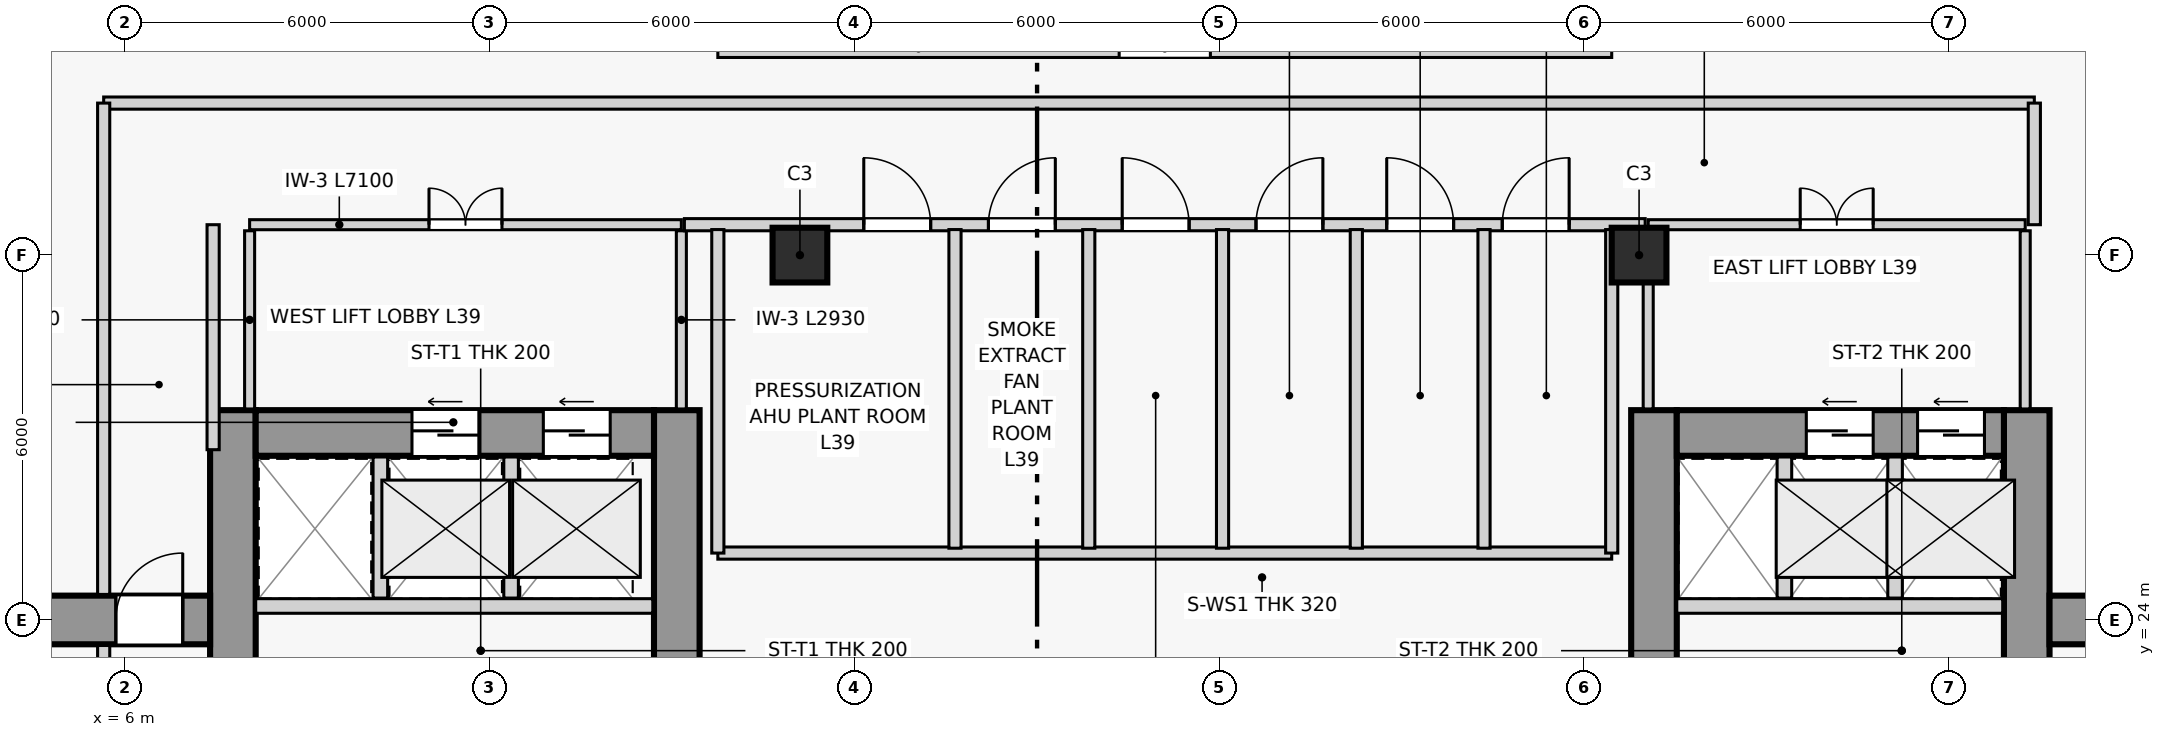
"""IFC4 building model, lengths in metres.
Left out: names, types, materials, properties, quantities, classifications, styles, units other than length and angle.
Written with IfcOpenShell. Run it as: python <this file> out.ifc"""

import sys

from ifc_helpers import new_model, si_unit, direction, frame, frame_2d, origin, origin_2d, place, context, subcontext, project, spatial, rectangle, extrude, source, transform, mapped, element, fill, save


model = new_model("IFC4")
c1 = context("Model", 3, precision=1e-05, world=origin(), true_north=direction((0.0, 1.0)))
c2 = subcontext(c1, "Body", "Model", "MODEL_VIEW")
j1 = project(units=[si_unit("LENGTHUNIT", "METRE"), si_unit("PLANEANGLEUNIT", "RADIAN")], contexts=[c1])
p1 = place(None, origin())
s1 = spatial("IfcSite", under=j1, at=p1, CompositionType="ELEMENT")
p2 = place(p1, origin())
s2 = spatial("IfcBuilding", under=s1, at=p2, CompositionType="ELEMENT")
p3 = place(p2, frame((0.0, 0.0, 148.5)))
s3 = spatial("IfcBuildingStorey", under=s2, at=p3, CompositionType="ELEMENT", Elevation=148.5)
p4 = place(p3, frame((7.775, 14.6, 0.0), z_axis=(0.0, 0.0, 1.0), x_axis=(0.0, 1.0, 0.0)))
e1 = element("IfcWall", 1, at=p4, inside=s3, PredefinedType="SHEAR", context=c2, shape_type="SweptSolid", body=[
    extrude(rectangle(XDim=12.85, YDim=0.75, at=frame_2d((6.425, 0.0))), origin(), (0.0, 0.0, 1.0), 7.2),
])
p5 = place(p3, frame((15.075, 14.6, 0.0), z_axis=(0.0, 0.0, 1.0), x_axis=(0.0, 1.0, 0.0)))
e2 = element("IfcWall", 2, at=p5, inside=s3, PredefinedType="SHEAR", context=c2, shape_type="SweptSolid", body=[
    extrude(rectangle(XDim=12.85, YDim=0.75, at=frame_2d((6.425, 0.0))), origin(), (0.0, 0.0, 1.0), 7.2),
])
p6 = place(p5, frame((5.5, 0.0, 0.0)))
e3 = element("IfcOpeningElement", 3, at=p6, cuts=e2, PredefinedType="OPENING", context=c2, shape_type="SweptSolid", body=[
    extrude(rectangle(XDim=1.1, YDim=2.2, at=frame_2d((0.55, 1.1))), frame((0.0, 0.385, 0.0), z_axis=(0.0, -1.0, 0.0), x_axis=(1.0, 0.0, 0.0)), (0.0, 0.0, 1.0), 0.77),
])
p7 = place(p3, frame((8.15, 27.075, 0.0), z_axis=(0.0, 0.0, 1.0), x_axis=(1.0, 0.0, 0.0)))
e4 = element("IfcWall", 4, at=p7, inside=s3, PredefinedType="SHEAR", context=c2, shape_type="SweptSolid", body=[
    extrude(rectangle(XDim=6.55, YDim=0.75, at=frame_2d((3.275, 0.0))), origin(), (0.0, 0.0, 1.0), 7.2),
])
p8 = place(p7, frame((2.57, 0.0, 0.0)))
e5 = element("IfcOpeningElement", 5, at=p8, cuts=e4, PredefinedType="OPENING", context=c2, shape_type="SweptSolid", body=[
    extrude(rectangle(XDim=1.1, YDim=2.2, at=frame_2d((0.55, 1.1))), frame((0.0, 0.385, 0.0), z_axis=(0.0, -1.0, 0.0), x_axis=(1.0, 0.0, 0.0)), (0.0, 0.0, 1.0), 0.77),
])
p9 = place(p7, frame((4.73, 0.0, 0.0)))
e6 = element("IfcOpeningElement", 6, at=p9, cuts=e4, PredefinedType="OPENING", context=c2, shape_type="SweptSolid", body=[
    extrude(rectangle(XDim=1.1, YDim=2.2, at=frame_2d((0.55, 1.1))), frame((0.0, 0.385, 0.0), z_axis=(0.0, -1.0, 0.0), x_axis=(1.0, 0.0, 0.0)), (0.0, 0.0, 1.0), 0.77),
])
p10 = place(p3, frame((31.145, 14.6, 0.0), z_axis=(0.0, 0.0, 1.0), x_axis=(0.0, 1.0, 0.0)))
e7 = element("IfcWall", 7, at=p10, inside=s3, PredefinedType="SHEAR", context=c2, shape_type="SweptSolid", body=[
    extrude(rectangle(XDim=12.85, YDim=0.75, at=frame_2d((6.425, 0.0))), origin(), (0.0, 0.0, 1.0), 7.2),
])
p11 = place(p3, frame((37.275, 14.6, 0.0), z_axis=(0.0, 0.0, 1.0), x_axis=(0.0, 1.0, 0.0)))
e8 = element("IfcWall", 8, at=p11, inside=s3, PredefinedType="SHEAR", context=c2, shape_type="SweptSolid", body=[
    extrude(rectangle(XDim=12.85, YDim=0.75, at=frame_2d((6.425, 0.0))), origin(), (0.0, 0.0, 1.0), 7.2),
])
p12 = place(p11, frame((5.5, 0.0, 0.0)))
e9 = element("IfcOpeningElement", 9, at=p12, cuts=e8, PredefinedType="OPENING", context=c2, shape_type="SweptSolid", body=[
    extrude(rectangle(XDim=1.1, YDim=2.2, at=frame_2d((0.55, 1.1))), frame((0.0, 0.385, 0.0), z_axis=(0.0, -1.0, 0.0), x_axis=(1.0, 0.0, 0.0)), (0.0, 0.0, 1.0), 0.77),
])
p13 = place(p3, frame((31.52, 27.075, 0.0), z_axis=(0.0, 0.0, 1.0), x_axis=(1.0, 0.0, 0.0)))
e10 = element("IfcWall", 10, at=p13, inside=s3, PredefinedType="SHEAR", context=c2, shape_type="SweptSolid", body=[
    extrude(rectangle(XDim=5.38, YDim=0.75, at=frame_2d((2.69, 0.0))), origin(), (0.0, 0.0, 1.0), 7.2),
])
p14 = place(p13, frame((2.13, 0.0, 0.0)))
e11 = element("IfcOpeningElement", 11, at=p14, cuts=e10, PredefinedType="OPENING", context=c2, shape_type="SweptSolid", body=[
    extrude(rectangle(XDim=1.1, YDim=2.2, at=frame_2d((0.55, 1.1))), frame((0.0, 0.385, 0.0), z_axis=(0.0, -1.0, 0.0), x_axis=(1.0, 0.0, 0.0)), (0.0, 0.0, 1.0), 0.77),
])
p15 = place(p13, frame((3.96, 0.0, 0.0)))
e12 = element("IfcOpeningElement", 12, at=p15, cuts=e10, PredefinedType="OPENING", context=c2, shape_type="SweptSolid", body=[
    extrude(rectangle(XDim=1.1, YDim=2.2, at=frame_2d((0.55, 1.1))), frame((0.0, 0.385, 0.0), z_axis=(0.0, -1.0, 0.0), x_axis=(1.0, 0.0, 0.0)), (0.0, 0.0, 1.0), 0.77),
])
m1 = source(origin(), c2, "Body", "SweptSolid", [
    extrude(rectangle(XDim=0.9, YDim=0.9, at=origin_2d()), origin(), (0.0, 0.0, 1.0), 7.2),
])
for number, where, z_axis, x_axis in (
    (13, (17.1, 30.0, 0.0), (0.0, 0.0, 1.0), (1.0, 0.0, 0.0)),
    (14, (30.9, 30.0, 0.0), (0.0, 0.0, 1.0), (1.0, 0.0, 0.0)),
):
    element("IfcColumn", number, at=place(p3, frame(where, z_axis=z_axis, x_axis=x_axis)), inside=s3, PredefinedType="COLUMN", context=c2, shape_type="MappedRepresentation", body=[
        mapped(m1, transform((0.0, 0.0, 0.0), scale=1.0)),
    ])
p16 = place(p3, frame((0.65, 24.0, 0.0), z_axis=(0.0, 0.0, 1.0), x_axis=(1.0, 0.0, 0.0)))
e15 = element("IfcWall", 15, at=p16, inside=s3, PredefinedType="SOLIDWALL", context=c2, shape_type="SweptSolid", body=[
    extrude(rectangle(XDim=6.75, YDim=0.8, at=frame_2d((3.375, 0.0))), origin(), (0.0, 0.0, 1.0), 6.55),
])
p17 = place(p16, frame((5.2, 0.0, 0.0)))
e16 = element("IfcOpeningElement", 16, at=p17, cuts=e15, PredefinedType="OPENING", context=c2, shape_type="SweptSolid", body=[
    extrude(rectangle(XDim=1.1, YDim=2.2, at=frame_2d((0.55, 1.1))), frame((0.0, 0.41, 0.0), z_axis=(0.0, -1.0, 0.0), x_axis=(1.0, 0.0, 0.0)), (0.0, 0.0, 1.0), 0.82),
])
p18 = place(p3, frame((37.65, 24.0, 0.0), z_axis=(0.0, 0.0, 1.0), x_axis=(1.0, 0.0, 0.0)))
e17 = element("IfcWall", 17, at=p18, inside=s3, PredefinedType="SOLIDWALL", context=c2, shape_type="SweptSolid", body=[
    extrude(rectangle(XDim=6.7, YDim=0.8, at=frame_2d((3.35, 0.0))), origin(), (0.0, 0.0, 1.0), 6.55),
])
p19 = place(p3, frame((15.75, 33.4, 0.0), z_axis=(0.0, 0.0, 1.0), x_axis=(1.0, 0.0, 0.0)))
e18 = element("IfcWall", 18, at=p19, inside=s3, PredefinedType="SOLIDWALL", context=c2, shape_type="SweptSolid", body=[
    extrude(rectangle(XDim=14.7, YDim=0.3, at=frame_2d((7.35, 0.0))), origin(), (0.0, 0.0, 1.0), 6.55),
])
p20 = place(p19, frame((6.6, 0.0, 0.0)))
e19 = element("IfcOpeningElement", 19, at=p20, cuts=e18, PredefinedType="OPENING", context=c2, shape_type="SweptSolid", body=[
    extrude(rectangle(XDim=1.5, YDim=2.3, at=frame_2d((0.75, 1.15))), frame((0.0, 0.16, 0.0), z_axis=(0.0, -1.0, 0.0), x_axis=(1.0, 0.0, 0.0)), (0.0, 0.0, 1.0), 0.32),
])
p21 = place(p3, frame((8.15, 24.23, 0.0), z_axis=(0.0, 0.0, 1.0), x_axis=(1.0, 0.0, 0.0)))
e20 = element("IfcWall", 20, at=p21, inside=s3, PredefinedType="PARTITIONING", context=c2, shape_type="SweptSolid", body=[
    extrude(rectangle(XDim=6.53, YDim=0.24, at=frame_2d((3.265, 0.0))), origin(), (0.0, 0.0, 1.0), 6.55),
])
for number, where, z_axis, x_axis in (
    (21, (10.2, 24.36, 0.0), (0.0, 0.0, 1.0), (0.0, 1.0, 0.0)),
    (22, (12.35, 24.36, 0.0), (0.0, 0.0, 1.0), (0.0, 1.0, 0.0)),
):
    element("IfcWall", number, at=place(p3, frame(where, z_axis=z_axis, x_axis=x_axis)), inside=s3, PredefinedType="PARTITIONING", context=c2, shape_type="SweptSolid", body=[
        extrude(rectangle(XDim=2.32, YDim=0.24, at=frame_2d((1.16, 0.0))), origin(), (0.0, 0.0, 1.0), 6.55),
    ])
p22 = place(p3, frame((31.52, 24.23, 0.0), z_axis=(0.0, 0.0, 1.0), x_axis=(1.0, 0.0, 0.0)))
e23 = element("IfcWall", 23, at=p22, inside=s3, PredefinedType="PARTITIONING", context=c2, shape_type="SweptSolid", body=[
    extrude(rectangle(XDim=5.36, YDim=0.24, at=frame_2d((2.68, 0.0))), origin(), (0.0, 0.0, 1.0), 6.55),
])
for number, where, z_axis, x_axis in (
    (24, (33.29, 24.36, 0.0), (0.0, 0.0, 1.0), (0.0, 1.0, 0.0)),
    (25, (35.11, 24.36, 0.0), (0.0, 0.0, 1.0), (0.0, 1.0, 0.0)),
):
    element("IfcWall", number, at=place(p3, frame(where, z_axis=z_axis, x_axis=x_axis)), inside=s3, PredefinedType="PARTITIONING", context=c2, shape_type="SweptSolid", body=[
        extrude(rectangle(XDim=2.32, YDim=0.24, at=frame_2d((1.16, 0.0))), origin(), (0.0, 0.0, 1.0), 6.55),
    ])
p23 = place(p3, frame((8.05, 30.5, 0.0), z_axis=(0.0, 0.0, 1.0), x_axis=(1.0, 0.0, 0.0)))
e26 = element("IfcWall", 26, at=p23, inside=s3, PredefinedType="PARTITIONING", context=c2, shape_type="SweptSolid", body=[
    extrude(rectangle(XDim=7.1, YDim=0.165, at=frame_2d((3.55, 0.0))), origin(), (0.0, 0.0, 1.0), 4.95),
])
p24 = place(p23, frame((2.95, 0.0, 0.0)))
e27 = element("IfcOpeningElement", 27, at=p24, cuts=e26, PredefinedType="OPENING", context=c2, shape_type="SweptSolid", body=[
    extrude(rectangle(XDim=1.2, YDim=2.2, at=frame_2d((0.6, 1.1))), frame((0.0, 0.093, 0.0), z_axis=(0.0, -1.0, 0.0), x_axis=(1.0, 0.0, 0.0)), (0.0, 0.0, 1.0), 0.185),
])
for number, where, z_axis, x_axis in (
    (28, (8.05, 27.47, 0.0), (0.0, 0.0, 1.0), (0.0, 1.0, 0.0)),
    (29, (15.15, 27.47, 0.0), (0.0, 0.0, 1.0), (0.0, 1.0, 0.0)),
):
    element("IfcWall", number, at=place(p3, frame(where, z_axis=z_axis, x_axis=x_axis)), inside=s3, PredefinedType="PARTITIONING", context=c2, shape_type="SweptSolid", body=[
        extrude(rectangle(XDim=2.93, YDim=0.165, at=frame_2d((1.465, 0.0))), origin(), (0.0, 0.0, 1.0), 6.55),
    ])
p25 = place(p3, frame((31.05, 30.5, 0.0), z_axis=(0.0, 0.0, 1.0), x_axis=(1.0, 0.0, 0.0)))
e30 = element("IfcWall", 30, at=p25, inside=s3, PredefinedType="PARTITIONING", context=c2, shape_type="SweptSolid", body=[
    extrude(rectangle(XDim=6.2, YDim=0.165, at=frame_2d((3.1, 0.0))), origin(), (0.0, 0.0, 1.0), 4.95),
])
p26 = place(p25, frame((2.5, 0.0, 0.0)))
e31 = element("IfcOpeningElement", 31, at=p26, cuts=e30, PredefinedType="OPENING", context=c2, shape_type="SweptSolid", body=[
    extrude(rectangle(XDim=1.2, YDim=2.2, at=frame_2d((0.6, 1.1))), frame((0.0, 0.093, 0.0), z_axis=(0.0, -1.0, 0.0), x_axis=(1.0, 0.0, 0.0)), (0.0, 0.0, 1.0), 0.185),
])
p27 = place(p3, frame((31.05, 27.47, 0.0), z_axis=(0.0, 0.0, 1.0), x_axis=(0.0, 1.0, 0.0)))
e32 = element("IfcWall", 32, at=p27, inside=s3, PredefinedType="PARTITIONING", context=c2, shape_type="SweptSolid", body=[
    extrude(rectangle(XDim=2.93, YDim=0.165, at=frame_2d((1.465, 0.0))), origin(), (0.0, 0.0, 1.0), 4.95),
])
p28 = place(p3, frame((37.25, 27.47, 0.0), z_axis=(0.0, 0.0, 1.0), x_axis=(0.0, 1.0, 0.0)))
e33 = element("IfcWall", 33, at=p28, inside=s3, PredefinedType="PARTITIONING", context=c2, shape_type="SweptSolid", body=[
    extrude(rectangle(XDim=2.93, YDim=0.165, at=frame_2d((1.465, 0.0))), origin(), (0.0, 0.0, 1.0), 6.55),
])
p29 = place(p3, frame((5.65, 32.5, 0.0), z_axis=(0.0, 0.0, 1.0), x_axis=(1.0, 0.0, 0.0)))
e34 = element("IfcWall", 34, at=p29, inside=s3, PredefinedType="PARTITIONING", context=c2, shape_type="SweptSolid", body=[
    extrude(rectangle(XDim=31.75, YDim=0.2, at=frame_2d((15.875, 0.0))), origin(), (0.0, 0.0, 1.0), 6.55),
])
p30 = place(p3, frame((15.2, 30.5, 0.0), z_axis=(0.0, 0.0, 1.0), x_axis=(1.0, 0.0, 0.0)))
e35 = element("IfcWall", 35, at=p30, inside=s3, PredefinedType="PARTITIONING", context=c2, shape_type="SweptSolid", body=[
    extrude(rectangle(XDim=15.8, YDim=0.2, at=frame_2d((7.9, 0.0))), origin(), (0.0, 0.0, 1.0), 4.95),
])
p31 = place(p30, frame((2.95, 0.0, 0.0)))
e36 = element("IfcOpeningElement", 36, at=p31, cuts=e35, PredefinedType="OPENING", context=c2, shape_type="SweptSolid", body=[
    extrude(rectangle(XDim=1.1, YDim=2.2, at=frame_2d((0.55, 1.1))), frame((0.0, 0.11, 0.0), z_axis=(0.0, -1.0, 0.0), x_axis=(1.0, 0.0, 0.0)), (0.0, 0.0, 1.0), 0.22),
])
p32 = place(p30, frame((5.0, 0.0, 0.0)))
e37 = element("IfcOpeningElement", 37, at=p32, cuts=e35, PredefinedType="OPENING", context=c2, shape_type="SweptSolid", body=[
    extrude(rectangle(XDim=1.1, YDim=2.2, at=frame_2d((0.55, 1.1))), frame((0.0, 0.11, 0.0), z_axis=(0.0, -1.0, 0.0), x_axis=(1.0, 0.0, 0.0)), (0.0, 0.0, 1.0), 0.22),
])
p33 = place(p30, frame((7.2, 0.0, 0.0)))
e38 = element("IfcOpeningElement", 38, at=p33, cuts=e35, PredefinedType="OPENING", context=c2, shape_type="SweptSolid", body=[
    extrude(rectangle(XDim=1.1, YDim=2.2, at=frame_2d((0.55, 1.1))), frame((0.0, 0.11, 0.0), z_axis=(0.0, -1.0, 0.0), x_axis=(1.0, 0.0, 0.0)), (0.0, 0.0, 1.0), 0.22),
])
p34 = place(p30, frame((9.4, 0.0, 0.0)))
e39 = element("IfcOpeningElement", 39, at=p34, cuts=e35, PredefinedType="OPENING", context=c2, shape_type="SweptSolid", body=[
    extrude(rectangle(XDim=1.1, YDim=2.2, at=frame_2d((0.55, 1.1))), frame((0.0, 0.11, 0.0), z_axis=(0.0, -1.0, 0.0), x_axis=(1.0, 0.0, 0.0)), (0.0, 0.0, 1.0), 0.22),
])
p35 = place(p30, frame((11.55, 0.0, 0.0)))
e40 = element("IfcOpeningElement", 40, at=p35, cuts=e35, PredefinedType="OPENING", context=c2, shape_type="SweptSolid", body=[
    extrude(rectangle(XDim=1.1, YDim=2.2, at=frame_2d((0.55, 1.1))), frame((0.0, 0.11, 0.0), z_axis=(0.0, -1.0, 0.0), x_axis=(1.0, 0.0, 0.0)), (0.0, 0.0, 1.0), 0.22),
])
p36 = place(p30, frame((13.45, 0.0, 0.0)))
e41 = element("IfcOpeningElement", 41, at=p36, cuts=e35, PredefinedType="OPENING", context=c2, shape_type="SweptSolid", body=[
    extrude(rectangle(XDim=1.1, YDim=2.2, at=frame_2d((0.55, 1.1))), frame((0.0, 0.11, 0.0), z_axis=(0.0, -1.0, 0.0), x_axis=(1.0, 0.0, 0.0)), (0.0, 0.0, 1.0), 0.22),
])
p37 = place(p3, frame((37.4, 30.5, 0.0), z_axis=(0.0, 0.0, 1.0), x_axis=(0.0, 1.0, 0.0)))
e42 = element("IfcWall", 42, at=p37, inside=s3, PredefinedType="PARTITIONING", context=c2, shape_type="SweptSolid", body=[
    extrude(rectangle(XDim=2.0, YDim=0.2, at=frame_2d((1.0, 0.0))), origin(), (0.0, 0.0, 1.0), 6.55),
])
p38 = place(p3, frame((15.75, 25.1, 0.0), z_axis=(0.0, 0.0, 1.0), x_axis=(1.0, 0.0, 0.0)))
e43 = element("IfcWall", 43, at=p38, inside=s3, PredefinedType="PARTITIONING", context=c2, shape_type="SweptSolid", body=[
    extrude(rectangle(XDim=14.7, YDim=0.2, at=frame_2d((7.35, 0.0))), origin(), (0.0, 0.0, 1.0), 6.55),
])
p39 = place(p3, frame((15.75, 25.1, 0.0), z_axis=(0.0, 0.0, 1.0), x_axis=(0.0, 1.0, 0.0)))
e44 = element("IfcWall", 44, at=p39, inside=s3, PredefinedType="PARTITIONING", context=c2, shape_type="SweptSolid", body=[
    extrude(rectangle(XDim=5.32, YDim=0.2, at=frame_2d((2.66, 0.0))), origin(), (0.0, 0.0, 1.0), 6.55),
])
p40 = place(p3, frame((30.45, 25.1, 0.0), z_axis=(0.0, 0.0, 1.0), x_axis=(0.0, 1.0, 0.0)))
e45 = element("IfcWall", 45, at=p40, inside=s3, PredefinedType="PARTITIONING", context=c2, shape_type="SweptSolid", body=[
    extrude(rectangle(XDim=5.32, YDim=0.2, at=frame_2d((2.66, 0.0))), origin(), (0.0, 0.0, 1.0), 4.95),
])
for number, where, z_axis, x_axis in (
    (46, (19.65, 25.18, 0.0), (0.0, 0.0, 1.0), (0.0, 1.0, 0.0)),
    (47, (21.85, 25.18, 0.0), (0.0, 0.0, 1.0), (0.0, 1.0, 0.0)),
    (48, (24.05, 25.18, 0.0), (0.0, 0.0, 1.0), (0.0, 1.0, 0.0)),
    (49, (26.25, 25.18, 0.0), (0.0, 0.0, 1.0), (0.0, 1.0, 0.0)),
    (50, (28.35, 25.18, 0.0), (0.0, 0.0, 1.0), (0.0, 1.0, 0.0)),
):
    element("IfcWall", number, at=place(p3, frame(where, z_axis=z_axis, x_axis=x_axis)), inside=s3, PredefinedType="PARTITIONING", context=c2, shape_type="SweptSolid", body=[
        extrude(rectangle(XDim=5.24, YDim=0.2, at=frame_2d((2.62, 0.0))), origin(), (0.0, 0.0, 1.0), 6.55),
    ])
p41 = place(p3, frame((5.65, 18.42, 0.0), z_axis=(0.0, 0.0, 1.0), x_axis=(0.0, 1.0, 0.0)))
e51 = element("IfcWall", 51, at=p41, inside=s3, PredefinedType="PARTITIONING", context=c2, shape_type="SweptSolid", body=[
    extrude(rectangle(XDim=5.16, YDim=0.2, at=frame_2d((2.58, 0.0))), origin(), (0.0, 0.0, 1.0), 6.55),
])
p42 = place(p3, frame((5.65, 24.42, 0.0), z_axis=(0.0, 0.0, 1.0), x_axis=(0.0, 1.0, 0.0)))
e52 = element("IfcWall", 52, at=p42, inside=s3, PredefinedType="PARTITIONING", context=c2, shape_type="SweptSolid", body=[
    extrude(rectangle(XDim=8.08, YDim=0.2, at=frame_2d((4.04, 0.0))), origin(), (0.0, 0.0, 1.0), 4.95),
])
p43 = place(p3, frame((7.45, 26.8, 0.0), z_axis=(0.0, 0.0, 1.0), x_axis=(0.0, 1.0, 0.0)))
e53 = element("IfcWall", 53, at=p43, inside=s3, PredefinedType="PARTITIONING", context=c2, shape_type="SweptSolid", body=[
    extrude(rectangle(XDim=3.7, YDim=0.2, at=frame_2d((1.85, 0.0))), origin(), (0.0, 0.0, 1.0), 6.55),
])
m2 = source(origin(), c2, "Body", "SweptSolid", [
    extrude(rectangle(XDim=1.1, YDim=2.2, at=frame_2d((0.55, 1.1))), frame((0.0, 0.025, 0.0), z_axis=(0.0, -1.0, 0.0), x_axis=(1.0, 0.0, 0.0)), (0.0, 0.0, 1.0), 0.05),
])
p44 = place(p8, origin())
e54 = element("IfcDoor", 54, at=p44, inside=s3, OperationType="SLIDING_TO_LEFT", PredefinedType="DOOR", context=c2, shape_type="MappedRepresentation", body=[
    mapped(m2, transform((0.0, 0.0, 0.0), scale=1.0)),
])
fill(e5, e54)
p45 = place(p9, origin())
e55 = element("IfcDoor", 55, at=p45, inside=s3, OperationType="SLIDING_TO_LEFT", PredefinedType="DOOR", context=c2, shape_type="MappedRepresentation", body=[
    mapped(m2, transform((0.0, 0.0, 0.0), scale=1.0)),
])
fill(e6, e55)
p46 = place(p14, origin())
e56 = element("IfcDoor", 56, at=p46, inside=s3, OperationType="SLIDING_TO_LEFT", PredefinedType="DOOR", context=c2, shape_type="MappedRepresentation", body=[
    mapped(m2, transform((0.0, 0.0, 0.0), scale=1.0)),
])
fill(e11, e56)
p47 = place(p15, origin())
e57 = element("IfcDoor", 57, at=p47, inside=s3, OperationType="SLIDING_TO_LEFT", PredefinedType="DOOR", context=c2, shape_type="MappedRepresentation", body=[
    mapped(m2, transform((0.0, 0.0, 0.0), scale=1.0)),
])
fill(e12, e57)
m3 = source(origin(), c2, "Body", "SweptSolid", [
    extrude(rectangle(XDim=1.2, YDim=2.2, at=frame_2d((0.6, 1.1))), frame((0.0, 0.025, 0.0), z_axis=(0.0, -1.0, 0.0), x_axis=(1.0, 0.0, 0.0)), (0.0, 0.0, 1.0), 0.05),
])
p48 = place(p24, origin())
e58 = element("IfcDoor", 58, at=p48, inside=s3, OperationType="DOUBLE_DOOR_SINGLE_SWING", PredefinedType="DOOR", context=c2, shape_type="MappedRepresentation", body=[
    mapped(m3, transform((0.0, 0.0, 0.0), scale=1.0)),
])
fill(e27, e58)
p49 = place(p26, origin())
e59 = element("IfcDoor", 59, at=p49, inside=s3, OperationType="DOUBLE_DOOR_SINGLE_SWING", PredefinedType="DOOR", context=c2, shape_type="MappedRepresentation", body=[
    mapped(m3, transform((0.0, 0.0, 0.0), scale=1.0)),
])
fill(e31, e59)
m4 = source(origin(), c2, "Body", "SweptSolid", [
    extrude(rectangle(XDim=1.1, YDim=2.2, at=frame_2d((0.55, 1.1))), frame((0.0, 0.025, 0.0), z_axis=(0.0, -1.0, 0.0), x_axis=(1.0, 0.0, 0.0)), (0.0, 0.0, 1.0), 0.05),
])
p50 = place(p31, origin())
e60 = element("IfcDoor", 60, at=p50, inside=s3, OperationType="SINGLE_SWING_LEFT", PredefinedType="DOOR", context=c2, shape_type="MappedRepresentation", body=[
    mapped(m4, transform((0.0, 0.0, 0.0), scale=1.0)),
])
fill(e36, e60)
p51 = place(p32, origin())
e61 = element("IfcDoor", 61, at=p51, inside=s3, OperationType="SINGLE_SWING_RIGHT", PredefinedType="DOOR", context=c2, shape_type="MappedRepresentation", body=[
    mapped(m4, transform((0.0, 0.0, 0.0), scale=1.0)),
])
fill(e37, e61)
p52 = place(p33, origin())
e62 = element("IfcDoor", 62, at=p52, inside=s3, OperationType="SINGLE_SWING_LEFT", PredefinedType="DOOR", context=c2, shape_type="MappedRepresentation", body=[
    mapped(m4, transform((0.0, 0.0, 0.0), scale=1.0)),
])
fill(e38, e62)
p53 = place(p34, origin())
e63 = element("IfcDoor", 63, at=p53, inside=s3, OperationType="SINGLE_SWING_RIGHT", PredefinedType="DOOR", context=c2, shape_type="MappedRepresentation", body=[
    mapped(m4, transform((0.0, 0.0, 0.0), scale=1.0)),
])
fill(e39, e63)
p54 = place(p35, origin())
e64 = element("IfcDoor", 64, at=p54, inside=s3, OperationType="SINGLE_SWING_LEFT", PredefinedType="DOOR", context=c2, shape_type="MappedRepresentation", body=[
    mapped(m4, transform((0.0, 0.0, 0.0), scale=1.0)),
])
fill(e40, e64)
p55 = place(p36, origin())
e65 = element("IfcDoor", 65, at=p55, inside=s3, OperationType="SINGLE_SWING_RIGHT", PredefinedType="DOOR", context=c2, shape_type="MappedRepresentation", body=[
    mapped(m4, transform((0.0, 0.0, 0.0), scale=1.0)),
])
fill(e41, e65)
p56 = place(p17, origin())
e66 = element("IfcDoor", 66, at=p56, inside=s3, OperationType="SINGLE_SWING_RIGHT", PredefinedType="DOOR", context=c2, shape_type="MappedRepresentation", body=[
    mapped(m4, transform((0.0, 0.0, 0.0), scale=1.0)),
])
fill(e16, e66)
save(model, sys.argv[1])
